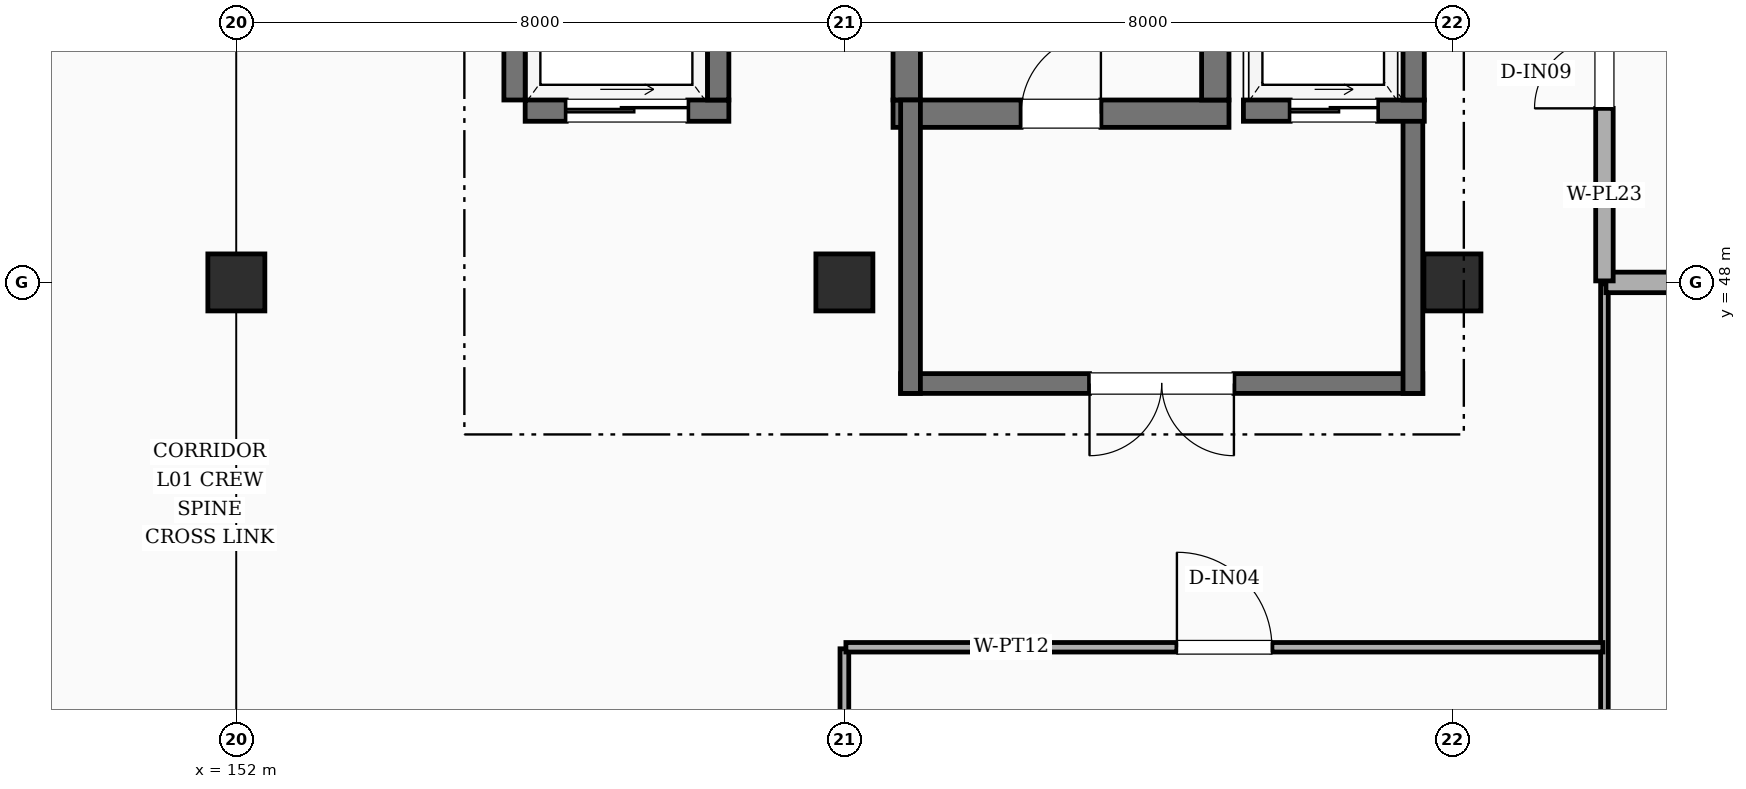
"""IFC4 building model, lengths in metres.
Left out: names, types, materials, properties, quantities, classifications, styles, units other than length and angle.
Written with IfcOpenShell. Run it as: python <this file> out.ifc"""

import sys

from ifc_helpers import new_model, si_unit, direction, frame, frame_2d, origin, origin_2d, place, context, subcontext, project, spatial, rectangle, extrude, element, fill, save


model = new_model("IFC4")
c1 = context("Model", 3, precision=1e-05, world=origin(), true_north=direction((0.0, 1.0)))
c2 = subcontext(c1, "Body", "Model", "MODEL_VIEW")
j1 = project(units=[si_unit("LENGTHUNIT", "METRE"), si_unit("PLANEANGLEUNIT", "RADIAN")], contexts=[c1])
p1 = place(None, origin())
s1 = spatial("IfcSite", under=j1, at=p1, CompositionType="ELEMENT")
p2 = place(p1, origin())
s2 = spatial("IfcBuilding", under=s1, at=p2, CompositionType="ELEMENT")
p3 = place(p2, frame((0.0, 0.0, 5.4)))
s3 = spatial("IfcBuildingStorey", under=s2, at=p3, CompositionType="ELEMENT", Elevation=5.4)
for number, where, z_axis, x_axis in (
    (1, (152.0, 48.0, 0.0), (0.0, 0.0, 1.0), (1.0, 0.0, 0.0)),
    (2, (160.0, 48.0, 0.0), (0.0, 0.0, 1.0), (1.0, 0.0, 0.0)),
    (3, (168.0, 48.0, 0.0), (0.0, 0.0, 1.0), (1.0, 0.0, 0.0)),
):
    element("IfcColumn", number, at=place(p3, frame(where, z_axis=z_axis, x_axis=x_axis)), inside=s3, PredefinedType="COLUMN", context=c2, shape_type="SweptSolid", body=[
        extrude(rectangle(XDim=0.75, YDim=0.75, at=origin_2d()), origin(), (0.0, 0.0, 1.0), 5.4),
    ])
p4 = place(p3, frame((160.64, 50.22, 0.0), z_axis=(0.0, 0.0, 1.0), x_axis=(1.0, 0.0, 0.0)))
e4 = element("IfcWall", 4, at=p4, inside=s3, PredefinedType="SHEAR", context=c2, shape_type="SweptSolid", body=[
    extrude(rectangle(XDim=4.42, YDim=0.36, at=frame_2d((2.21, 0.0))), origin(), (0.0, 0.0, 1.0), 5.4),
])
p5 = place(p4, frame((1.685, 0.0, 0.0)))
e5 = element("IfcOpeningElement", 5, at=p5, cuts=e4, PredefinedType="OPENING", context=c2, shape_type="SweptSolid", body=[
    extrude(rectangle(XDim=1.05, YDim=2.15, at=frame_2d((0.525, 1.075))), frame((0.0, 0.19, 0.0), z_axis=(0.0, -1.0, 0.0), x_axis=(1.0, 0.0, 0.0)), (0.0, 0.0, 1.0), 0.38),
])
for number, where, z_axis, x_axis in (
    (6, (160.82, 50.4, 0.0), (0.0, 0.0, 1.0), (0.0, 1.0, 0.0)),
    (7, (164.88, 50.4, 0.0), (0.0, 0.0, 1.0), (0.0, 1.0, 0.0)),
):
    element("IfcWall", number, at=place(p3, frame(where, z_axis=z_axis, x_axis=x_axis)), inside=s3, PredefinedType="SHEAR", context=c2, shape_type="SweptSolid", body=[
        extrude(rectangle(XDim=8.6, YDim=0.36, at=frame_2d((4.3, 0.0))), origin(), (0.0, 0.0, 1.0), 5.4),
    ])
p6 = place(p3, frame((167.61, 46.67, 0.0), z_axis=(0.0, 0.0, 1.0), x_axis=(-1.0, 0.0, 0.0)))
e8 = element("IfcWall", 8, at=p6, inside=s3, PredefinedType="SHEAR", context=c2, shape_type="SweptSolid", body=[
    extrude(rectangle(XDim=6.87, YDim=0.26, at=frame_2d((3.435, 0.0))), origin(), (0.0, 0.0, 1.0), 5.4),
])
p7 = place(p6, frame((2.485, 0.0, 0.0)))
e9 = element("IfcOpeningElement", 9, at=p7, cuts=e8, PredefinedType="OPENING", context=c2, shape_type="SweptSolid", body=[
    extrude(rectangle(XDim=1.9, YDim=2.25, at=frame_2d((0.95, 1.125))), frame((0.0, 0.14, 0.0), z_axis=(0.0, -1.0, 0.0), x_axis=(1.0, 0.0, 0.0)), (0.0, 0.0, 1.0), 0.28),
])
for number, where, z_axis, x_axis in (
    (10, (160.87, 46.54, 0.0), (0.0, 0.0, 1.0), (0.0, 1.0, 0.0)),
    (11, (167.48, 46.54, 0.0), (0.0, 0.0, 1.0), (0.0, 1.0, 0.0)),
):
    element("IfcWall", number, at=place(p3, frame(where, z_axis=z_axis, x_axis=x_axis)), inside=s3, PredefinedType="SHEAR", context=c2, shape_type="SweptSolid", body=[
        extrude(rectangle(XDim=3.86, YDim=0.26, at=frame_2d((1.93, 0.0))), origin(), (0.0, 0.0, 1.0), 5.4),
    ])
p8 = place(p3, frame((165.25, 50.26, 0.0), z_axis=(0.0, 0.0, 1.0), x_axis=(1.0, 0.0, 0.0)))
e12 = element("IfcWall", 12, at=p8, inside=s3, PredefinedType="SHEAR", context=c2, shape_type="SweptSolid", body=[
    extrude(rectangle(XDim=2.38, YDim=0.28, at=frame_2d((1.19, 0.0))), origin(), (0.0, 0.0, 1.0), 5.4),
])
p9 = place(p8, frame((0.615, 0.0, 0.0)))
e13 = element("IfcOpeningElement", 13, at=p9, cuts=e12, PredefinedType="OPENING", context=c2, shape_type="SweptSolid", body=[
    extrude(rectangle(XDim=1.15, YDim=2.2, at=frame_2d((0.575, 1.1))), frame((0.0, 0.15, 0.0), z_axis=(0.0, -1.0, 0.0), x_axis=(1.0, 0.0, 0.0)), (0.0, 0.0, 1.0), 0.3),
])
p10 = place(p3, frame((167.49, 50.4, 0.0), z_axis=(0.0, 0.0, 1.0), x_axis=(0.0, 1.0, 0.0)))
e14 = element("IfcWall", 14, at=p10, inside=s3, PredefinedType="SHEAR", context=c2, shape_type="SweptSolid", body=[
    extrude(rectangle(XDim=2.8, YDim=0.28, at=frame_2d((1.4, 0.0))), origin(), (0.0, 0.0, 1.0), 5.4),
])
p11 = place(p3, frame((155.8, 50.26, 0.0), z_axis=(0.0, 0.0, 1.0), x_axis=(1.0, 0.0, 0.0)))
e15 = element("IfcWall", 15, at=p11, inside=s3, PredefinedType="SHEAR", context=c2, shape_type="SweptSolid", body=[
    extrude(rectangle(XDim=2.68, YDim=0.28, at=frame_2d((1.34, 0.0))), origin(), (0.0, 0.0, 1.0), 5.4),
])
p12 = place(p11, frame((0.54, 0.0, 0.0)))
e16 = element("IfcOpeningElement", 16, at=p12, cuts=e15, PredefinedType="OPENING", context=c2, shape_type="SweptSolid", body=[
    extrude(rectangle(XDim=1.6, YDim=2.35, at=frame_2d((0.8, 1.175))), frame((0.0, 0.15, 0.0), z_axis=(0.0, -1.0, 0.0), x_axis=(1.0, 0.0, 0.0)), (0.0, 0.0, 1.0), 0.3),
])
for number, where, z_axis, x_axis in (
    (17, (158.34, 50.4, 0.0), (0.0, 0.0, 1.0), (0.0, 1.0, 0.0)),
    (18, (155.66, 50.4, 0.0), (0.0, 0.0, 1.0), (0.0, 1.0, 0.0)),
):
    element("IfcWall", number, at=place(p3, frame(where, z_axis=z_axis, x_axis=x_axis)), inside=s3, PredefinedType="SHEAR", context=c2, shape_type="SweptSolid", body=[
        extrude(rectangle(XDim=3.2, YDim=0.28, at=frame_2d((1.6, 0.0))), origin(), (0.0, 0.0, 1.0), 5.4),
    ])
p13 = place(p3, frame((160.0, 24.02, 0.0), z_axis=(0.0, 0.0, 1.0), x_axis=(0.0, 1.0, 0.0)))
e19 = element("IfcWall", 19, at=p13, inside=s3, PredefinedType="PARTITIONING", context=c2, shape_type="SweptSolid", body=[
    extrude(rectangle(XDim=19.16, YDim=0.115, at=frame_2d((9.58, 0.0))), origin(), (0.0, 0.0, 1.0), 4.39),
])
p14 = place(p3, frame((170.0, 24.02, 0.0), z_axis=(0.0, 0.0, 1.0), x_axis=(0.0, 1.0, 0.0)))
e20 = element("IfcWall", 20, at=p14, inside=s3, PredefinedType="PARTITIONING", context=c2, shape_type="SweptSolid", body=[
    extrude(rectangle(XDim=23.96, YDim=0.1, at=frame_2d((11.98, 0.0))), origin(), (0.0, 0.0, 1.0), 4.39),
])
p15 = place(p14, frame((11.44, 0.0, 0.0)))
e21 = element("IfcOpeningElement", 21, at=p15, cuts=e20, PredefinedType="OPENING", context=c2, shape_type="SweptSolid", body=[
    extrude(rectangle(XDim=1.08, YDim=2.15, at=frame_2d((0.54, 1.075))), frame((0.0, 0.06, 0.0), z_axis=(0.0, -1.0, 0.0), x_axis=(1.0, 0.0, 0.0)), (0.0, 0.0, 1.0), 0.12),
])
p16 = place(p3, frame((170.02, 48.0, 0.0), z_axis=(0.0, 0.0, 1.0), x_axis=(1.0, 0.0, 0.0)))
e22 = element("IfcWall", 22, at=p16, inside=s3, PredefinedType="PLUMBINGWALL", context=c2, shape_type="SweptSolid", body=[
    extrude(rectangle(XDim=5.86, YDim=0.27, at=frame_2d((2.93, 0.0))), origin(), (0.0, 0.0, 1.0), 4.39),
])
p17 = place(p3, frame((170.0, 48.02, 0.0), z_axis=(0.0, 0.0, 1.0), x_axis=(0.0, 1.0, 0.0)))
e23 = element("IfcWall", 23, at=p17, inside=s3, PredefinedType="PLUMBINGWALL", context=c2, shape_type="SweptSolid", body=[
    extrude(rectangle(XDim=5.46, YDim=0.23, at=frame_2d((2.73, 0.0))), origin(), (0.0, 0.0, 1.0), 4.39),
])
p18 = place(p17, frame((2.27, 0.0, 0.0)))
e24 = element("IfcOpeningElement", 24, at=p18, cuts=e23, PredefinedType="OPENING", context=c2, shape_type="SweptSolid", body=[
    extrude(rectangle(XDim=0.92, YDim=2.1, at=frame_2d((0.46, 1.05))), frame((0.0, 0.125, 0.0), z_axis=(0.0, -1.0, 0.0), x_axis=(1.0, 0.0, 0.0)), (0.0, 0.0, 1.0), 0.25),
])
p19 = place(p3, frame((160.02, 43.2, 0.0), z_axis=(0.0, 0.0, 1.0), x_axis=(1.0, 0.0, 0.0)))
e25 = element("IfcWall", 25, at=p19, inside=s3, PredefinedType="PARTITIONING", context=c2, shape_type="SweptSolid", body=[
    extrude(rectangle(XDim=9.96, YDim=0.125, at=frame_2d((4.98, 0.0))), origin(), (0.0, 0.0, 1.0), 4.39),
])
p20 = place(p19, frame((4.355, 0.0, 0.0)))
e26 = element("IfcOpeningElement", 26, at=p20, cuts=e25, PredefinedType="OPENING", context=c2, shape_type="SweptSolid", body=[
    extrude(rectangle(XDim=1.25, YDim=2.15, at=frame_2d((0.625, 1.075))), frame((0.0, 0.073, 0.0), z_axis=(0.0, -1.0, 0.0), x_axis=(1.0, 0.0, 0.0)), (0.0, 0.0, 1.0), 0.145),
])
p21 = place(p5, origin())
e27 = element("IfcDoor", 27, at=p21, inside=s3, OperationType="SINGLE_SWING_RIGHT", PredefinedType="DOOR", context=c2, shape_type="SweptSolid", body=[
    extrude(rectangle(XDim=1.05, YDim=2.15, at=frame_2d((0.525, 1.075))), frame((0.0, 0.025, 0.0), z_axis=(0.0, -1.0, 0.0), x_axis=(1.0, 0.0, 0.0)), (0.0, 0.0, 1.0), 0.05),
])
fill(e5, e27)
p22 = place(p7, origin())
e28 = element("IfcDoor", 28, at=p22, inside=s3, OperationType="DOUBLE_DOOR_SINGLE_SWING", PredefinedType="DOOR", context=c2, shape_type="SweptSolid", body=[
    extrude(rectangle(XDim=1.9, YDim=2.25, at=frame_2d((0.95, 1.125))), frame((0.0, 0.025, 0.0), z_axis=(0.0, -1.0, 0.0), x_axis=(1.0, 0.0, 0.0)), (0.0, 0.0, 1.0), 0.05),
])
fill(e9, e28)
p23 = place(p9, origin())
e29 = element("IfcDoor", 29, at=p23, inside=s3, OperationType="SLIDING_TO_LEFT", PredefinedType="DOOR", context=c2, shape_type="SweptSolid", body=[
    extrude(rectangle(XDim=1.15, YDim=2.2, at=frame_2d((0.575, 1.1))), frame((0.0, 0.025, 0.0), z_axis=(0.0, -1.0, 0.0), x_axis=(1.0, 0.0, 0.0)), (0.0, 0.0, 1.0), 0.05),
])
fill(e13, e29)
p24 = place(p12, origin())
e30 = element("IfcDoor", 30, at=p24, inside=s3, OperationType="SLIDING_TO_LEFT", PredefinedType="DOOR", context=c2, shape_type="SweptSolid", body=[
    extrude(rectangle(XDim=1.6, YDim=2.35, at=frame_2d((0.8, 1.175))), frame((0.0, 0.025, 0.0), z_axis=(0.0, -1.0, 0.0), x_axis=(1.0, 0.0, 0.0)), (0.0, 0.0, 1.0), 0.05),
])
fill(e16, e30)
p25 = place(p18, origin())
e31 = element("IfcDoor", 31, at=p25, inside=s3, OperationType="SINGLE_SWING_LEFT", PredefinedType="DOOR", context=c2, shape_type="SweptSolid", body=[
    extrude(rectangle(XDim=0.92, YDim=2.1, at=frame_2d((0.46, 1.05))), frame((0.0, 0.025, 0.0), z_axis=(0.0, -1.0, 0.0), x_axis=(1.0, 0.0, 0.0)), (0.0, 0.0, 1.0), 0.05),
])
fill(e24, e31)
p26 = place(p20, origin())
e32 = element("IfcDoor", 32, at=p26, inside=s3, OperationType="SINGLE_SWING_LEFT", PredefinedType="DOOR", context=c2, shape_type="SweptSolid", body=[
    extrude(rectangle(XDim=1.25, YDim=2.15, at=frame_2d((0.625, 1.075))), frame((0.0, 0.025, 0.0), z_axis=(0.0, -1.0, 0.0), x_axis=(1.0, 0.0, 0.0)), (0.0, 0.0, 1.0), 0.05),
])
fill(e26, e32)
save(model, sys.argv[1])
